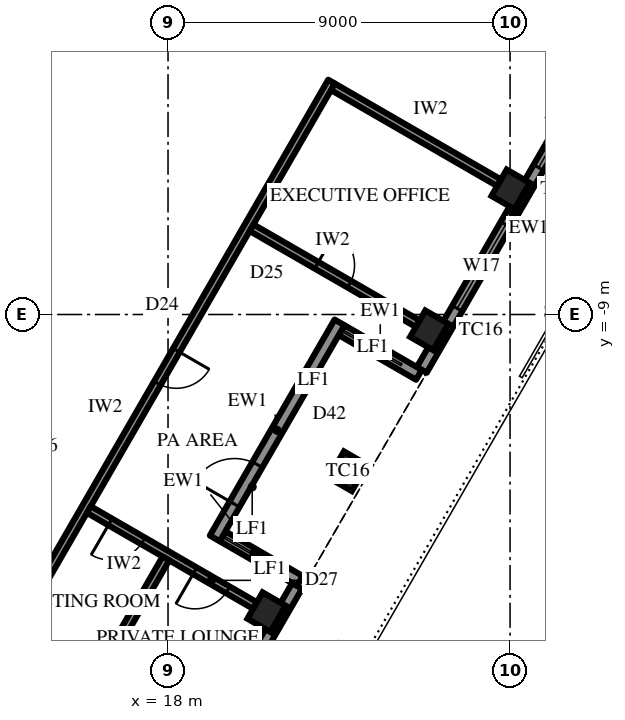
"""IFC4 building model, lengths in metres.
Left out: names, types, materials, properties, quantities, classifications, styles, units other than length and angle.
Written with IfcOpenShell. Run it as: python <this file> out.ifc"""

import sys

from ifc_helpers import new_model, si_unit, direction, frame, frame_2d, origin, origin_2d, place, context, subcontext, project, spatial, rectangle, extrude, element, fill, save


model = new_model("IFC4")
c1 = context("Model", 3, precision=1e-05, world=origin(), true_north=direction((0.0, 1.0)))
c2 = subcontext(c1, "Body", "Model", "MODEL_VIEW")
j1 = project(units=[si_unit("LENGTHUNIT", "METRE"), si_unit("PLANEANGLEUNIT", "RADIAN")], contexts=[c1])
p1 = place(None, origin())
s1 = spatial("IfcSite", under=j1, at=p1, CompositionType="ELEMENT")
p2 = place(p1, origin())
s2 = spatial("IfcBuilding", under=s1, at=p2, CompositionType="ELEMENT")
p3 = place(p2, frame((0.0, 0.0, 382.9)))
s3 = spatial("IfcBuildingStorey", under=s2, at=p3, CompositionType="ELEMENT", Elevation=382.9)
for number, where, z_axis, x_axis in (
    (1, (20.592, -16.833, 0.0), (0.0, 0.0, 1.0), (0.5, 0.866, 0.0)),
    (2, (22.733, -13.125, 0.0), (0.0, 0.0, 1.0), (0.5, 0.866, 0.0)),
    (3, (24.874, -9.417, 0.0), (0.0, 0.0, 1.0), (0.5, 0.866, 0.0)),
    (4, (27.015, -5.708, 0.0), (0.0, 0.0, 1.0), (0.5, 0.866, 0.0)),
):
    element("IfcColumn", number, at=place(p3, frame(where, z_axis=z_axis, x_axis=x_axis)), inside=s3, PredefinedType="COLUMN", context=c2, shape_type="SweptSolid", body=[
        extrude(rectangle(XDim=0.8, YDim=0.7, at=origin_2d()), origin(), (0.0, 0.0, 1.0), 4.2),
    ])
p4 = place(p3, frame((16.613, -24.425, 0.0), z_axis=(0.0, 0.0, 1.0), x_axis=(0.499996453679, 0.866027451244, 0.0)))
e5 = element("IfcWall", 5, at=p4, inside=s3, PredefinedType="SOLIDWALL", context=c2, shape_type="SweptSolid", body=[
    extrude(rectangle(XDim=9.564, YDim=0.3, at=frame_2d((4.782, 0.0))), origin(), (0.0, 0.0, 1.0), 2.9),
])
p5 = place(p4, frame((0.866, 0.0, 0.6)))
e6 = element("IfcOpeningElement", 6, at=p5, cuts=e5, PredefinedType="OPENING", context=c2, shape_type="SweptSolid", body=[
    extrude(rectangle(XDim=2.55, YDim=2.05, at=frame_2d((1.275, 1.025))), frame((0.0, 0.16, 0.0), z_axis=(0.0, -1.0, 0.0), x_axis=(1.0, 0.0, 0.0)), (0.0, 0.0, 1.0), 0.32),
])
p6 = place(p4, frame((5.823, 0.0, 0.0)))
e7 = element("IfcOpeningElement", 7, at=p6, cuts=e5, PredefinedType="OPENING", context=c2, shape_type="SweptSolid", body=[
    extrude(rectangle(XDim=1.2, YDim=2.4, at=frame_2d((0.6, 1.2))), frame((0.0, 0.16, 0.0), z_axis=(0.0, -1.0, 0.0), x_axis=(1.0, 0.0, 0.0)), (0.0, 0.0, 1.0), 0.32),
])
p7 = place(p3, frame((24.677, -10.458, 0.0), z_axis=(0.0, 0.0, 1.0), x_axis=(0.499996453679, 0.866027451244, 0.0)))
e8 = element("IfcWall", 8, at=p7, inside=s3, PredefinedType="SOLIDWALL", context=c2, shape_type="SweptSolid", body=[
    extrude(rectangle(XDim=9.564, YDim=0.3, at=frame_2d((4.782, 0.0))), origin(), (0.0, 0.0, 1.0), 2.9),
])
p8 = place(p7, frame((1.866, 0.0, 0.6)))
e9 = element("IfcOpeningElement", 9, at=p8, cuts=e8, PredefinedType="OPENING", context=c2, shape_type="SweptSolid", body=[
    extrude(rectangle(XDim=2.55, YDim=2.05, at=frame_2d((1.275, 1.025))), frame((0.0, 0.16, 0.0), z_axis=(0.0, -1.0, 0.0), x_axis=(1.0, 0.0, 0.0)), (0.0, 0.0, 1.0), 0.32),
])
p9 = place(p7, frame((6.148, 0.0, 0.6)))
e10 = element("IfcOpeningElement", 10, at=p9, cuts=e8, PredefinedType="OPENING", context=c2, shape_type="SweptSolid", body=[
    extrude(rectangle(XDim=2.55, YDim=2.05, at=frame_2d((1.275, 1.025))), frame((0.0, 0.16, 0.0), z_axis=(0.0, -1.0, 0.0), x_axis=(1.0, 0.0, 0.0)), (0.0, 0.0, 1.0), 0.32),
])
for number, where, z_axis, x_axis in (
    (11, (21.47, -16.012, 0.0), (0.0, 0.0, 1.0), (-0.866, 0.5, 0.0)),
    (12, (24.602, -10.588, 0.0), (0.0, 0.0, 1.0), (-0.866, 0.5, 0.0)),
):
    element("IfcWall", number, at=place(p3, frame(where, z_axis=z_axis, x_axis=x_axis)), inside=s3, PredefinedType="SOLIDWALL", context=c2, shape_type="SweptSolid", body=[
        extrude(rectangle(XDim=2.35, YDim=0.3, at=frame_2d((1.175, 0.0))), origin(), (0.0, 0.0, 1.0), 2.9),
    ])
p10 = place(p3, frame((19.23, -14.892, 0.0), z_axis=(0.0, 0.0, 1.0), x_axis=(0.499999339774, 0.866025784966, 0.0)))
e13 = element("IfcWall", 13, at=p10, inside=s3, PredefinedType="SOLIDWALL", context=c2, shape_type="SweptSolid", body=[
    extrude(rectangle(XDim=6.564, YDim=0.3, at=frame_2d((3.282, 0.0))), origin(), (0.0, 0.0, 1.0), 2.9),
])
p11 = place(p10, frame((1.041, 0.0, 0.0)))
e14 = element("IfcOpeningElement", 14, at=p11, cuts=e13, PredefinedType="OPENING", context=c2, shape_type="SweptSolid", body=[
    extrude(rectangle(XDim=1.2, YDim=2.4, at=frame_2d((0.6, 1.2))), frame((0.0, 0.16, 0.0), z_axis=(0.0, -1.0, 0.0), x_axis=(1.0, 0.0, 0.0)), (0.0, 0.0, 1.0), 0.32),
])
p12 = place(p3, frame((13.638, -17.878, 0.0), z_axis=(0.0, 0.0, 1.0), x_axis=(0.500006217173, 0.866021814268, 0.0)))
e15 = element("IfcWall", 15, at=p12, inside=s3, PredefinedType="PARTITIONING", context=c2, shape_type="SweptSolid", body=[
    extrude(rectangle(XDim=17.328, YDim=0.2, at=frame_2d((8.664, 0.0))), origin(), (0.0, 0.0, 1.0), 4.0),
])
p13 = place(p12, frame((8.164, 0.0, 0.0)))
e16 = element("IfcOpeningElement", 16, at=p13, cuts=e15, PredefinedType="OPENING", context=c2, shape_type="SweptSolid", body=[
    extrude(rectangle(XDim=1.0, YDim=2.2, at=frame_2d((0.5, 1.1))), frame((0.0, 0.11, 0.0), z_axis=(0.0, -1.0, 0.0), x_axis=(1.0, 0.0, 0.0)), (0.0, 0.0, 1.0), 0.22),
])
p14 = place(p3, frame((15.916, -14.133, 0.0), z_axis=(0.0, 0.0, 1.0), x_axis=(0.866018134068, -0.500012591307, 0.0)))
e17 = element("IfcWall", 17, at=p14, inside=s3, PredefinedType="PARTITIONING", context=c2, shape_type="SweptSolid", body=[
    extrude(rectangle(XDim=5.05, YDim=0.2, at=frame_2d((2.525, 0.0))), origin(), (0.0, 0.0, 1.0), 3.082),
])
p15 = place(p14, frame((0.65, 0.0, 0.0)))
e18 = element("IfcOpeningElement", 18, at=p15, cuts=e17, PredefinedType="OPENING", context=c2, shape_type="SweptSolid", body=[
    extrude(rectangle(XDim=1.0, YDim=2.2, at=frame_2d((0.5, 1.1))), frame((0.0, 0.11, 0.0), z_axis=(0.0, -1.0, 0.0), x_axis=(1.0, 0.0, 0.0)), (0.0, 0.0, 1.0), 0.22),
])
p16 = place(p14, frame((3.225, 0.0, 0.0)))
e19 = element("IfcOpeningElement", 19, at=p16, cuts=e17, PredefinedType="OPENING", context=c2, shape_type="SweptSolid", body=[
    extrude(rectangle(XDim=1.0, YDim=2.2, at=frame_2d((0.5, 1.1))), frame((0.0, 0.11, 0.0), z_axis=(0.0, -1.0, 0.0), x_axis=(1.0, 0.0, 0.0)), (0.0, 0.0, 1.0), 0.22),
])
p17 = place(p3, frame((20.198, -6.717, 0.0), z_axis=(0.0, 0.0, 1.0), x_axis=(0.866006046928, -0.500033525561, 0.0)))
e20 = element("IfcWall", 20, at=p17, inside=s3, PredefinedType="PARTITIONING", context=c2, shape_type="SweptSolid", body=[
    extrude(rectangle(XDim=5.05, YDim=0.2, at=frame_2d((2.525, 0.0))), origin(), (0.0, 0.0, 1.0), 2.992),
])
p18 = place(p17, frame((1.975, 0.0, 0.0)))
e21 = element("IfcOpeningElement", 21, at=p18, cuts=e20, PredefinedType="OPENING", context=c2, shape_type="SweptSolid", body=[
    extrude(rectangle(XDim=1.0, YDim=2.2, at=frame_2d((0.5, 1.1))), frame((0.0, 0.11, 0.0), z_axis=(0.0, -1.0, 0.0), x_axis=(1.0, 0.0, 0.0)), (0.0, 0.0, 1.0), 0.22),
])
p19 = place(p3, frame((22.339, -3.008, 0.0), z_axis=(0.0, 0.0, 1.0), x_axis=(0.866018134068, -0.500012591307, 0.0)))
e22 = element("IfcWall", 22, at=p19, inside=s3, PredefinedType="PARTITIONING", context=c2, shape_type="SweptSolid", body=[
    extrude(rectangle(XDim=5.05, YDim=0.2, at=frame_2d((2.525, 0.0))), origin(), (0.0, 0.0, 1.0), 3.082),
])
p20 = place(p3, frame((15.903, -18.955, 0.0), z_axis=(0.0, 0.0, 1.0), x_axis=(0.499998569178, 0.866026229868, 0.0)))
e23 = element("IfcWall", 23, at=p20, inside=s3, PredefinedType="PARTITIONING", context=c2, shape_type="SweptSolid", body=[
    extrude(rectangle(XDim=4.082, YDim=0.2, at=frame_2d((2.041, 0.0))), origin(), (0.0, 0.0, 1.0), 4.0),
])
p21 = place(p8, origin())
e24 = element("IfcWindow", 24, at=p21, inside=s3, PartitioningType="SINGLE_PANEL", PredefinedType="WINDOW", context=c2, shape_type="SweptSolid", body=[
    extrude(rectangle(XDim=2.55, YDim=2.05, at=frame_2d((1.275, 1.025))), frame((0.0, 0.03, 0.0), z_axis=(0.0, -1.0, 0.0), x_axis=(1.0, 0.0, 0.0)), (0.0, 0.0, 1.0), 0.06),
])
fill(e9, e24)
p22 = place(p9, origin())
e25 = element("IfcWindow", 25, at=p22, inside=s3, PartitioningType="SINGLE_PANEL", PredefinedType="WINDOW", context=c2, shape_type="SweptSolid", body=[
    extrude(rectangle(XDim=2.55, YDim=2.05, at=frame_2d((1.275, 1.025))), frame((0.0, 0.03, 0.0), z_axis=(0.0, -1.0, 0.0), x_axis=(1.0, 0.0, 0.0)), (0.0, 0.0, 1.0), 0.06),
])
fill(e10, e25)
p23 = place(p11, origin())
e26 = element("IfcDoor", 26, at=p23, inside=s3, OperationType="SINGLE_SWING_RIGHT", PredefinedType="DOOR", context=c2, shape_type="SweptSolid", body=[
    extrude(rectangle(XDim=1.2, YDim=2.4, at=frame_2d((0.6, 1.2))), frame((0.0, 0.025, 0.0), z_axis=(0.0, -1.0, 0.0), x_axis=(1.0, 0.0, 0.0)), (0.0, 0.0, 1.0), 0.05),
])
fill(e14, e26)
p24 = place(p15, frame((1.0, 0.0, 0.0), z_axis=(0.0, 0.0, 1.0), x_axis=(-1.0, 0.0, 0.0)))
e27 = element("IfcDoor", 27, at=p24, inside=s3, OperationType="SINGLE_SWING_LEFT", PredefinedType="DOOR", context=c2, shape_type="SweptSolid", body=[
    extrude(rectangle(XDim=1.0, YDim=2.2, at=frame_2d((0.5, 1.1))), frame((0.0, 0.025, 0.0), z_axis=(0.0, -1.0, 0.0), x_axis=(1.0, 0.0, 0.0)), (0.0, 0.0, 1.0), 0.05),
])
fill(e18, e27)
p25 = place(p16, frame((1.0, 0.0, 0.0), z_axis=(0.0, 0.0, 1.0), x_axis=(-1.0, 0.0, 0.0)))
e28 = element("IfcDoor", 28, at=p25, inside=s3, OperationType="SINGLE_SWING_LEFT", PredefinedType="DOOR", context=c2, shape_type="SweptSolid", body=[
    extrude(rectangle(XDim=1.0, YDim=2.2, at=frame_2d((0.5, 1.1))), frame((0.0, 0.025, 0.0), z_axis=(0.0, -1.0, 0.0), x_axis=(1.0, 0.0, 0.0)), (0.0, 0.0, 1.0), 0.05),
])
fill(e19, e28)
p26 = place(p13, frame((1.0, 0.0, 0.0), z_axis=(0.0, 0.0, 1.0), x_axis=(-1.0, 0.0, 0.0)))
e29 = element("IfcDoor", 29, at=p26, inside=s3, OperationType="SINGLE_SWING_RIGHT", PredefinedType="DOOR", context=c2, shape_type="SweptSolid", body=[
    extrude(rectangle(XDim=1.0, YDim=2.2, at=frame_2d((0.5, 1.1))), frame((0.0, 0.025, 0.0), z_axis=(0.0, -1.0, 0.0), x_axis=(1.0, 0.0, 0.0)), (0.0, 0.0, 1.0), 0.05),
])
fill(e16, e29)
p27 = place(p18, origin())
e30 = element("IfcDoor", 30, at=p27, inside=s3, OperationType="SINGLE_SWING_RIGHT", PredefinedType="DOOR", context=c2, shape_type="SweptSolid", body=[
    extrude(rectangle(XDim=1.0, YDim=2.2, at=frame_2d((0.5, 1.1))), frame((0.0, 0.025, 0.0), z_axis=(0.0, -1.0, 0.0), x_axis=(1.0, 0.0, 0.0)), (0.0, 0.0, 1.0), 0.05),
])
fill(e21, e30)
save(model, sys.argv[1])
